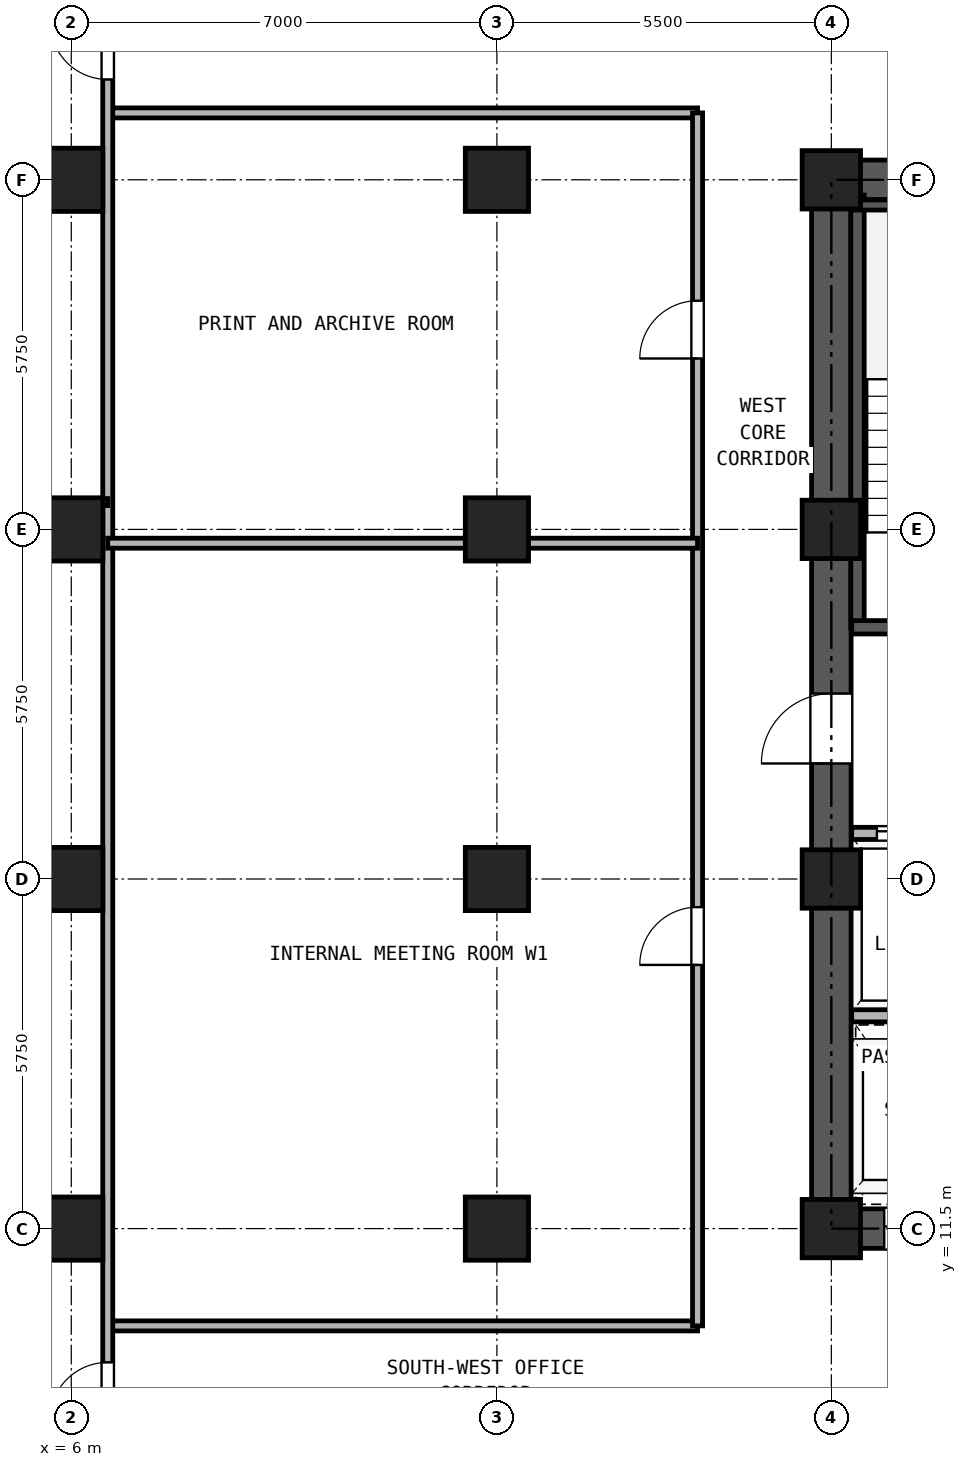
"""IFC4 building model, lengths in metres.
Left out: names, types, materials, properties, quantities, classifications, styles, units other than length and angle.
Written with IfcOpenShell. Run it as: python <this file> out.ifc"""

import sys

from ifc_helpers import new_model, si_unit, direction, frame, frame_2d, origin, origin_2d, place, context, subcontext, project, spatial, rectangle, hollow_rectangle, extrude, source, transform, mapped, element, fill, save


model = new_model("IFC4")
c1 = context("Model", 3, precision=1e-05, world=origin(), true_north=direction((0.0, 1.0)))
c2 = subcontext(c1, "Body", "Model", "MODEL_VIEW")
j1 = project(units=[si_unit("LENGTHUNIT", "METRE"), si_unit("PLANEANGLEUNIT", "RADIAN")], contexts=[c1])
p1 = place(None, origin())
s1 = spatial("IfcSite", under=j1, at=p1, CompositionType="ELEMENT")
p2 = place(p1, origin())
s2 = spatial("IfcBuilding", under=s1, at=p2, CompositionType="ELEMENT")
p3 = place(p2, frame((0.0, 0.0, 81.0)))
s3 = spatial("IfcBuildingStorey", under=s2, at=p3, CompositionType="ELEMENT", Elevation=81.0)
m1 = source(origin(), c2, "Body", "SweptSolid", [
    extrude(hollow_rectangle(XDim=1.04, YDim=1.04, WallThickness=0.065, at=origin_2d()), origin(), (0.0, 0.0, 1.0), 3.32),
])
for number, where, z_axis, x_axis in (
    (1, (6.0, 11.5, 0.0), (0.0, 0.0, 1.0), (1.0, 0.0, 0.0)),
    (2, (6.0, 17.25, 0.0), (0.0, 0.0, 1.0), (1.0, 0.0, 0.0)),
    (3, (6.0, 23.0, 0.0), (0.0, 0.0, 1.0), (1.0, 0.0, 0.0)),
    (4, (6.0, 28.75, 0.0), (0.0, 0.0, 1.0), (1.0, 0.0, 0.0)),
    (5, (13.0, 11.5, 0.0), (0.0, 0.0, 1.0), (1.0, 0.0, 0.0)),
    (6, (13.0, 17.25, 0.0), (0.0, 0.0, 1.0), (1.0, 0.0, 0.0)),
    (7, (13.0, 23.0, 0.0), (0.0, 0.0, 1.0), (1.0, 0.0, 0.0)),
    (8, (13.0, 28.75, 0.0), (0.0, 0.0, 1.0), (1.0, 0.0, 0.0)),
):
    element("IfcColumn", number, at=place(p3, frame(where, z_axis=z_axis, x_axis=x_axis)), inside=s3, PredefinedType="COLUMN", context=c2, shape_type="MappedRepresentation", body=[
        mapped(m1, transform((0.0, 0.0, 0.0), x_axis=(1.0, 0.0, 0.0), y_axis=(0.0, 1.0, 0.0), z_axis=(0.0, 0.0, 1.0), scale=1.0)),
    ])
m2 = source(origin(), c2, "Body", "SweptSolid", [
    extrude(hollow_rectangle(XDim=0.96, YDim=0.96, WallThickness=0.06, at=origin_2d()), origin(), (0.0, 0.0, 1.0), 3.32),
])
for number, where, z_axis, x_axis in (
    (9, (18.5, 11.5, 0.0), (0.0, 0.0, 1.0), (1.0, 0.0, 0.0)),
    (10, (18.5, 17.25, 0.0), (0.0, 0.0, 1.0), (1.0, 0.0, 0.0)),
    (11, (18.5, 23.0, 0.0), (0.0, 0.0, 1.0), (1.0, 0.0, 0.0)),
    (12, (18.5, 28.75, 0.0), (0.0, 0.0, 1.0), (1.0, 0.0, 0.0)),
):
    element("IfcColumn", number, at=place(p3, frame(where, z_axis=z_axis, x_axis=x_axis)), inside=s3, PredefinedType="COLUMN", context=c2, shape_type="MappedRepresentation", body=[
        mapped(m2, transform((0.0, 0.0, 0.0), x_axis=(1.0, 0.0, 0.0), y_axis=(0.0, 1.0, 0.0), z_axis=(0.0, 0.0, 1.0), scale=1.0)),
    ])
p4 = place(p3, frame((18.175, 11.5, 0.0), z_axis=(0.0, 0.0, 1.0), x_axis=(1.0, 0.0, 0.0)))
e13 = element("IfcWall", 13, at=p4, inside=s3, PredefinedType="SHEAR", context=c2, shape_type="SweptSolid", body=[
    extrude(rectangle(XDim=10.65, YDim=0.65, at=frame_2d((5.325, 0.0))), origin(), (0.0, 0.0, 1.0), 3.32),
])
p5 = place(p4, frame((1.195, 0.0, 0.0)))
e14 = element("IfcOpeningElement", 14, at=p5, cuts=e13, PredefinedType="OPENING", context=c2, shape_type="SweptSolid", body=[
    extrude(rectangle(XDim=1.1, YDim=2.25, at=frame_2d((0.55, 1.125))), frame((0.0, 0.335, 0.0), z_axis=(0.0, -1.0, 0.0), x_axis=(1.0, 0.0, 0.0)), (0.0, 0.0, 1.0), 0.67),
])
p6 = place(p4, frame((3.495, 0.0, 0.0)))
e15 = element("IfcOpeningElement", 15, at=p6, cuts=e13, PredefinedType="OPENING", context=c2, shape_type="SweptSolid", body=[
    extrude(rectangle(XDim=1.1, YDim=2.25, at=frame_2d((0.55, 1.125))), frame((0.0, 0.335, 0.0), z_axis=(0.0, -1.0, 0.0), x_axis=(1.0, 0.0, 0.0)), (0.0, 0.0, 1.0), 0.67),
])
p7 = place(p4, frame((5.925, 0.0, 0.0)))
e16 = element("IfcOpeningElement", 16, at=p7, cuts=e13, PredefinedType="OPENING", context=c2, shape_type="SweptSolid", body=[
    extrude(rectangle(XDim=1.1, YDim=2.25, at=frame_2d((0.55, 1.125))), frame((0.0, 0.335, 0.0), z_axis=(0.0, -1.0, 0.0), x_axis=(1.0, 0.0, 0.0)), (0.0, 0.0, 1.0), 0.67),
])
p8 = place(p4, frame((8.325, 0.0, 0.0)))
e17 = element("IfcOpeningElement", 17, at=p8, cuts=e13, PredefinedType="OPENING", context=c2, shape_type="SweptSolid", body=[
    extrude(rectangle(XDim=1.1, YDim=2.25, at=frame_2d((0.55, 1.125))), frame((0.0, 0.335, 0.0), z_axis=(0.0, -1.0, 0.0), x_axis=(1.0, 0.0, 0.0)), (0.0, 0.0, 1.0), 0.67),
])
p9 = place(p3, frame((18.175, 28.75, 0.0), z_axis=(0.0, 0.0, 1.0), x_axis=(1.0, 0.0, 0.0)))
e18 = element("IfcWall", 18, at=p9, inside=s3, PredefinedType="SHEAR", context=c2, shape_type="SweptSolid", body=[
    extrude(rectangle(XDim=10.65, YDim=0.65, at=frame_2d((5.325, 0.0))), origin(), (0.0, 0.0, 1.0), 3.32),
])
p10 = place(p9, frame((4.205, 0.0, 0.0)))
e19 = element("IfcOpeningElement", 19, at=p10, cuts=e18, PredefinedType="OPENING", context=c2, shape_type="SweptSolid", body=[
    extrude(rectangle(XDim=0.9, YDim=2.05, at=frame_2d((0.45, 1.025))), frame((0.0, 0.335, 0.0), z_axis=(0.0, -1.0, 0.0), x_axis=(1.0, 0.0, 0.0)), (0.0, 0.0, 1.0), 0.67),
])
p11 = place(p9, frame((5.745, 0.0, 0.0)))
e20 = element("IfcOpeningElement", 20, at=p11, cuts=e18, PredefinedType="OPENING", context=c2, shape_type="SweptSolid", body=[
    extrude(rectangle(XDim=0.9, YDim=2.05, at=frame_2d((0.45, 1.025))), frame((0.0, 0.335, 0.0), z_axis=(0.0, -1.0, 0.0), x_axis=(1.0, 0.0, 0.0)), (0.0, 0.0, 1.0), 0.67),
])
p12 = place(p3, frame((18.5, 11.825, 0.0), z_axis=(0.0, 0.0, 1.0), x_axis=(0.0, 1.0, 0.0)))
e21 = element("IfcWall", 21, at=p12, inside=s3, PredefinedType="SHEAR", context=c2, shape_type="SweptSolid", body=[
    extrude(rectangle(XDim=16.6, YDim=0.65, at=frame_2d((8.3, 0.0))), origin(), (0.0, 0.0, 1.0), 3.32),
])
p13 = place(p12, frame((7.325, 0.0, 0.0)))
e22 = element("IfcOpeningElement", 22, at=p13, cuts=e21, PredefinedType="OPENING", context=c2, shape_type="SweptSolid", body=[
    extrude(rectangle(XDim=1.15, YDim=2.2, at=frame_2d((0.575, 1.1))), frame((0.0, 0.335, 0.0), z_axis=(0.0, -1.0, 0.0), x_axis=(1.0, 0.0, 0.0)), (0.0, 0.0, 1.0), 0.67),
])
p14 = place(p3, frame((18.93, 21.39, 0.0), z_axis=(0.0, 0.0, 1.0), x_axis=(0.0, 1.0, 0.0)))
e23 = element("IfcWall", 23, at=p14, inside=s3, PredefinedType="SOLIDWALL", context=c2, shape_type="SweptSolid", body=[
    extrude(rectangle(XDim=7.11, YDim=0.22, at=frame_2d((3.555, 0.0))), origin(), (0.0, 0.0, 1.0), 3.32),
])
p15 = place(p3, frame((18.835, 28.335, 0.0), z_axis=(0.0, 0.0, 1.0), x_axis=(1.0, 0.0, 0.0)))
e24 = element("IfcWall", 24, at=p15, inside=s3, PredefinedType="PARTITIONING", context=c2, shape_type="SweptSolid", body=[
    extrude(rectangle(XDim=3.275, YDim=0.165, at=frame_2d((1.638, 0.0))), origin(), (0.0, 0.0, 1.0), 3.32),
])
p16 = place(p3, frame((18.835, 21.39, 0.0), z_axis=(0.0, 0.0, 1.0), x_axis=(1.0, 0.0, 0.0)))
e25 = element("IfcWall", 25, at=p16, inside=s3, PredefinedType="SOLIDWALL", context=c2, shape_type="SweptSolid", body=[
    extrude(rectangle(XDim=6.295, YDim=0.22, at=frame_2d((3.147, 0.0))), origin(), (0.0, 0.0, 1.0), 3.32),
])
p17 = place(p16, frame((1.015, 0.0, 0.0)))
e26 = element("IfcOpeningElement", 26, at=p17, cuts=e25, PredefinedType="OPENING", context=c2, shape_type="SweptSolid", body=[
    extrude(rectangle(XDim=1.15, YDim=2.2, at=frame_2d((0.575, 1.1))), frame((0.0, 0.12, 0.0), z_axis=(0.0, -1.0, 0.0), x_axis=(1.0, 0.0, 0.0)), (0.0, 0.0, 1.0), 0.24),
])
p18 = place(p16, frame((4.745, 0.0, 0.0)))
e27 = element("IfcOpeningElement", 27, at=p18, cuts=e25, PredefinedType="OPENING", context=c2, shape_type="SweptSolid", body=[
    extrude(rectangle(XDim=1.1, YDim=2.25, at=frame_2d((0.55, 1.125))), frame((0.0, 0.12, 0.0), z_axis=(0.0, -1.0, 0.0), x_axis=(1.0, 0.0, 0.0)), (0.0, 0.0, 1.0), 0.24),
])
p19 = place(p3, frame((18.835, 18.0, 0.0), z_axis=(0.0, 0.0, 1.0), x_axis=(1.0, 0.0, 0.0)))
e28 = element("IfcWall", 28, at=p19, inside=s3, PredefinedType="PARTITIONING", context=c2, shape_type="SweptSolid", body=[
    extrude(rectangle(XDim=9.33, YDim=0.2, at=frame_2d((4.665, 0.0))), origin(), (0.0, 0.0, 1.0), 3.32),
])
p20 = place(p19, frame((0.415, 0.0, 0.0)))
e29 = element("IfcOpeningElement", 29, at=p20, cuts=e28, PredefinedType="OPENING", context=c2, shape_type="SweptSolid", body=[
    extrude(rectangle(XDim=1.3, YDim=2.3, at=frame_2d((0.65, 1.15))), frame((0.0, 0.11, 0.0), z_axis=(0.0, -1.0, 0.0), x_axis=(1.0, 0.0, 0.0)), (0.0, 0.0, 1.0), 0.22),
])
p21 = place(p19, frame((2.515, 0.0, 0.0)))
e30 = element("IfcOpeningElement", 30, at=p21, cuts=e28, PredefinedType="OPENING", context=c2, shape_type="SweptSolid", body=[
    extrude(rectangle(XDim=1.3, YDim=2.3, at=frame_2d((0.65, 1.15))), frame((0.0, 0.11, 0.0), z_axis=(0.0, -1.0, 0.0), x_axis=(1.0, 0.0, 0.0)), (0.0, 0.0, 1.0), 0.22),
])
p22 = place(p19, frame((4.935, 0.0, 0.0)))
e31 = element("IfcOpeningElement", 31, at=p22, cuts=e28, PredefinedType="OPENING", context=c2, shape_type="SweptSolid", body=[
    extrude(rectangle(XDim=0.9, YDim=2.05, at=frame_2d((0.45, 1.025))), frame((0.0, 0.11, 0.0), z_axis=(0.0, -1.0, 0.0), x_axis=(1.0, 0.0, 0.0)), (0.0, 0.0, 1.0), 0.22),
])
p23 = place(p19, frame((8.065, 0.0, 0.0)))
e32 = element("IfcOpeningElement", 32, at=p23, cuts=e28, PredefinedType="OPENING", context=c2, shape_type="SweptSolid", body=[
    extrude(rectangle(XDim=0.9, YDim=2.05, at=frame_2d((0.45, 1.025))), frame((0.0, 0.11, 0.0), z_axis=(0.0, -1.0, 0.0), x_axis=(1.0, 0.0, 0.0)), (0.0, 0.0, 1.0), 0.22),
])
p24 = place(p3, frame((18.835, 15.0, 0.0), z_axis=(0.0, 0.0, 1.0), x_axis=(1.0, 0.0, 0.0)))
e33 = element("IfcWall", 33, at=p24, inside=s3, PredefinedType="PARTITIONING", context=c2, shape_type="SweptSolid", body=[
    extrude(rectangle(XDim=9.33, YDim=0.2, at=frame_2d((4.665, 0.0))), origin(), (0.0, 0.0, 1.0), 3.32),
])
for number, where, z_axis, x_axis in (
    (34, (6.6, 9.9, 0.0), (0.0, 0.0, 1.0), (1.0, 0.0, 0.0)),
    (35, (6.6, 29.85, 0.0), (0.0, 0.0, 1.0), (1.0, 0.0, 0.0)),
):
    element("IfcWall", number, at=place(p3, frame(where, z_axis=z_axis, x_axis=x_axis)), inside=s3, PredefinedType="PARTITIONING", context=c2, shape_type="SweptSolid", body=[
        extrude(rectangle(XDim=9.7, YDim=0.165, at=frame_2d((4.85, 0.0))), origin(), (0.0, 0.0, 1.0), 3.32),
    ])
p25 = place(p3, frame((16.3, 9.9, 0.0), z_axis=(0.0, 0.0, 1.0), x_axis=(0.0, 1.0, 0.0)))
e36 = element("IfcWall", 36, at=p25, inside=s3, PredefinedType="PARTITIONING", context=c2, shape_type="SweptSolid", body=[
    extrude(rectangle(XDim=19.95, YDim=0.165, at=frame_2d((9.975, 0.0))), origin(), (0.0, 0.0, 1.0), 3.32),
])
p26 = place(p25, frame((5.937, 0.0, 0.0)))
e37 = element("IfcOpeningElement", 37, at=p26, cuts=e36, PredefinedType="OPENING", context=c2, shape_type="SweptSolid", body=[
    extrude(rectangle(XDim=0.95, YDim=2.15, at=frame_2d((0.475, 1.075))), frame((0.0, 0.093, 0.0), z_axis=(0.0, -1.0, 0.0), x_axis=(1.0, 0.0, 0.0)), (0.0, 0.0, 1.0), 0.185),
])
p27 = place(p25, frame((15.911, 0.0, 0.0)))
e38 = element("IfcOpeningElement", 38, at=p27, cuts=e36, PredefinedType="OPENING", context=c2, shape_type="SweptSolid", body=[
    extrude(rectangle(XDim=0.95, YDim=2.15, at=frame_2d((0.475, 1.075))), frame((0.0, 0.093, 0.0), z_axis=(0.0, -1.0, 0.0), x_axis=(1.0, 0.0, 0.0)), (0.0, 0.0, 1.0), 0.185),
])
p28 = place(p3, frame((6.6, 0.16, 0.0), z_axis=(0.0, 0.0, 1.0), x_axis=(0.0, 1.0, 0.0)))
e39 = element("IfcWall", 39, at=p28, inside=s3, PredefinedType="PARTITIONING", context=c2, shape_type="SweptSolid", body=[
    extrude(rectangle(XDim=40.18, YDim=0.165, at=frame_2d((20.09, 0.0))), origin(), (0.0, 0.0, 1.0), 3.32),
])
p29 = place(p28, frame((8.19, 0.0, 0.0)))
e40 = element("IfcOpeningElement", 40, at=p29, cuts=e39, PredefinedType="OPENING", context=c2, shape_type="SweptSolid", body=[
    extrude(rectangle(XDim=0.95, YDim=2.15, at=frame_2d((0.475, 1.075))), frame((0.0, 0.093, 0.0), z_axis=(0.0, -1.0, 0.0), x_axis=(1.0, 0.0, 0.0)), (0.0, 0.0, 1.0), 0.185),
])
p30 = place(p28, frame((30.24, 0.0, 0.0)))
e41 = element("IfcOpeningElement", 41, at=p30, cuts=e39, PredefinedType="OPENING", context=c2, shape_type="SweptSolid", body=[
    extrude(rectangle(XDim=0.95, YDim=2.15, at=frame_2d((0.475, 1.075))), frame((0.0, 0.093, 0.0), z_axis=(0.0, -1.0, 0.0), x_axis=(1.0, 0.0, 0.0)), (0.0, 0.0, 1.0), 0.185),
])
p31 = place(p3, frame((0.16, 23.45, 0.0), z_axis=(0.0, 0.0, 1.0), x_axis=(1.0, 0.0, 0.0)))
e42 = element("IfcWall", 42, at=p31, inside=s3, PredefinedType="PARTITIONING", context=c2, shape_type="SweptSolid", body=[
    extrude(rectangle(XDim=6.44, YDim=0.115, at=frame_2d((3.22, 0.0))), origin(), (0.0, 0.0, 1.0), 3.32),
])
p32 = place(p3, frame((6.6, 22.773, 0.0), z_axis=(0.0, 0.0, 1.0), x_axis=(1.0, 0.0, 0.0)))
e43 = element("IfcWall", 43, at=p32, inside=s3, PredefinedType="PARTITIONING", context=c2, shape_type="SweptSolid", body=[
    extrude(rectangle(XDim=9.7, YDim=0.165, at=frame_2d((4.85, 0.0))), origin(), (0.0, 0.0, 1.0), 2.539),
])
p33 = place(p20, origin())
e44 = element("IfcDoor", 44, at=p33, inside=s3, OperationType="DOUBLE_DOOR_SLIDING", PredefinedType="DOOR", context=c2, shape_type="SweptSolid", body=[
    extrude(rectangle(XDim=1.3, YDim=2.3, at=frame_2d((0.65, 1.15))), frame((0.0, 0.025, 0.0), z_axis=(0.0, -1.0, 0.0), x_axis=(1.0, 0.0, 0.0)), (0.0, 0.0, 1.0), 0.05),
])
fill(e29, e44)
p34 = place(p13, frame((1.15, 0.0, 0.0), z_axis=(0.0, 0.0, 1.0), x_axis=(-1.0, 0.0, 0.0)))
e45 = element("IfcDoor", 45, at=p34, inside=s3, OperationType="SINGLE_SWING_LEFT", PredefinedType="DOOR", context=c2, shape_type="SweptSolid", body=[
    extrude(rectangle(XDim=1.15, YDim=2.2, at=frame_2d((0.575, 1.1))), frame((0.0, 0.025, 0.0), z_axis=(0.0, -1.0, 0.0), x_axis=(1.0, 0.0, 0.0)), (0.0, 0.0, 1.0), 0.05),
])
fill(e22, e45)
p35 = place(p5, frame((1.1, 0.0, 0.0), z_axis=(0.0, 0.0, 1.0), x_axis=(-1.0, 0.0, 0.0)))
e46 = element("IfcDoor", 46, at=p35, inside=s3, OperationType="DOUBLE_DOOR_SLIDING", PredefinedType="DOOR", context=c2, shape_type="SweptSolid", body=[
    extrude(rectangle(XDim=1.1, YDim=2.25, at=frame_2d((0.55, 1.125))), frame((0.0, 0.025, 0.0), z_axis=(0.0, -1.0, 0.0), x_axis=(1.0, 0.0, 0.0)), (0.0, 0.0, 1.0), 0.05),
])
fill(e14, e46)
p36 = place(p29, frame((0.95, 0.0, 0.0), z_axis=(0.0, 0.0, 1.0), x_axis=(-1.0, 0.0, 0.0)))
e47 = element("IfcDoor", 47, at=p36, inside=s3, OperationType="SINGLE_SWING_LEFT", PredefinedType="DOOR", context=c2, shape_type="SweptSolid", body=[
    extrude(rectangle(XDim=0.95, YDim=2.15, at=frame_2d((0.475, 1.075))), frame((0.0, 0.025, 0.0), z_axis=(0.0, -1.0, 0.0), x_axis=(1.0, 0.0, 0.0)), (0.0, 0.0, 1.0), 0.05),
])
fill(e40, e47)
p37 = place(p30, frame((0.95, 0.0, 0.0), z_axis=(0.0, 0.0, 1.0), x_axis=(-1.0, 0.0, 0.0)))
e48 = element("IfcDoor", 48, at=p37, inside=s3, OperationType="SINGLE_SWING_RIGHT", PredefinedType="DOOR", context=c2, shape_type="SweptSolid", body=[
    extrude(rectangle(XDim=0.95, YDim=2.15, at=frame_2d((0.475, 1.075))), frame((0.0, 0.025, 0.0), z_axis=(0.0, -1.0, 0.0), x_axis=(1.0, 0.0, 0.0)), (0.0, 0.0, 1.0), 0.05),
])
fill(e41, e48)
p38 = place(p26, frame((0.95, 0.0, 0.0), z_axis=(0.0, 0.0, 1.0), x_axis=(-1.0, 0.0, 0.0)))
e49 = element("IfcDoor", 49, at=p38, inside=s3, OperationType="SINGLE_SWING_LEFT", PredefinedType="DOOR", context=c2, shape_type="SweptSolid", body=[
    extrude(rectangle(XDim=0.95, YDim=2.15, at=frame_2d((0.475, 1.075))), frame((0.0, 0.025, 0.0), z_axis=(0.0, -1.0, 0.0), x_axis=(1.0, 0.0, 0.0)), (0.0, 0.0, 1.0), 0.05),
])
fill(e37, e49)
p39 = place(p27, frame((0.95, 0.0, 0.0), z_axis=(0.0, 0.0, 1.0), x_axis=(-1.0, 0.0, 0.0)))
e50 = element("IfcDoor", 50, at=p39, inside=s3, OperationType="SINGLE_SWING_LEFT", PredefinedType="DOOR", context=c2, shape_type="SweptSolid", body=[
    extrude(rectangle(XDim=0.95, YDim=2.15, at=frame_2d((0.475, 1.075))), frame((0.0, 0.025, 0.0), z_axis=(0.0, -1.0, 0.0), x_axis=(1.0, 0.0, 0.0)), (0.0, 0.0, 1.0), 0.05),
])
fill(e38, e50)
save(model, sys.argv[1])
